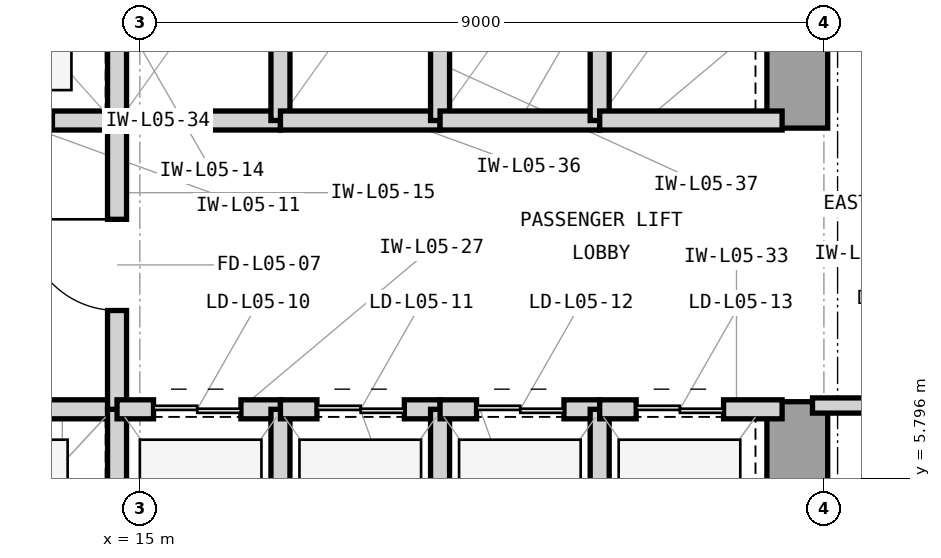
"""IFC4 building model, lengths in metres.
Left out: names, types, materials, properties, quantities, classifications, styles, units other than length and angle.
Written with IfcOpenShell. Run it as: python <this file> out.ifc"""

import sys

from ifc_helpers import new_model, si_unit, direction, frame, frame_2d, origin, place, context, subcontext, project, spatial, rectangle, extrude, element, fill, save


model = new_model("IFC4")
c1 = context("Model", 3, precision=1e-05, world=origin(), true_north=direction((0.0, 1.0)))
c2 = subcontext(c1, "Body", "Model", "MODEL_VIEW")
j1 = project(units=[si_unit("LENGTHUNIT", "METRE"), si_unit("PLANEANGLEUNIT", "RADIAN")], contexts=[c1])
p1 = place(None, origin())
s1 = spatial("IfcSite", under=j1, at=p1, CompositionType="ELEMENT")
p2 = place(p1, origin())
s2 = spatial("IfcBuilding", under=s1, at=p2, CompositionType="ELEMENT")
p3 = place(p2, frame((0.0, 0.0, 25.8)))
s3 = spatial("IfcBuildingStorey", under=s2, at=p3, CompositionType="ELEMENT", Elevation=25.8)
p4 = place(p3, frame((23.65, 3.75, 0.0), z_axis=(0.0, 0.0, 1.0), x_axis=(0.0, 1.0, 0.0)))
e1 = element("IfcWall", 1, at=p4, inside=s3, PredefinedType="SHEAR", context=c2, shape_type="SweptSolid", body=[
    extrude(rectangle(XDim=3.05, YDim=0.8, at=frame_2d((1.525, 0.0))), origin(), (0.0, 0.0, 1.0), 4.2),
])
p5 = place(p3, frame((23.65, 10.4, 0.0), z_axis=(0.0, 0.0, 1.0), x_axis=(0.0, 1.0, 0.0)))
e2 = element("IfcWall", 2, at=p5, inside=s3, PredefinedType="SHEAR", context=c2, shape_type="SweptSolid", body=[
    extrude(rectangle(XDim=3.2, YDim=0.8, at=frame_2d((1.6, 0.0))), origin(), (0.0, 0.0, 1.0), 4.2),
])
p6 = place(p3, frame((11.82, 6.7, 0.0), z_axis=(0.0, 0.0, 1.0), x_axis=(1.0, 0.0, 0.0)))
e3 = element("IfcWall", 3, at=p6, inside=s3, PredefinedType="PARTITIONING", context=c2, shape_type="SweptSolid", body=[
    extrude(rectangle(XDim=2.88, YDim=0.25, at=frame_2d((1.44, 0.0))), origin(), (0.0, 0.0, 1.0), 3.426),
])
p7 = place(p6, frame((0.85, 0.0, 0.0)))
e4 = element("IfcOpeningElement", 4, at=p7, cuts=e3, PredefinedType="OPENING", context=c2, shape_type="SweptSolid", body=[
    extrude(rectangle(XDim=1.1, YDim=2.25, at=frame_2d((0.55, 1.125))), frame((0.0, 0.135, 0.0), z_axis=(0.0, -1.0, 0.0), x_axis=(1.0, 0.0, 0.0)), (0.0, 0.0, 1.0), 0.27),
])
p8 = place(p3, frame((14.7, 3.35, 0.0), z_axis=(0.0, 0.0, 1.0), x_axis=(0.0, 1.0, 0.0)))
e5 = element("IfcWall", 5, at=p8, inside=s3, PredefinedType="PARTITIONING", context=c2, shape_type="SweptSolid", body=[
    extrude(rectangle(XDim=3.35, YDim=0.25, at=frame_2d((1.675, 0.0))), origin(), (0.0, 0.0, 1.0), 3.97),
])
p9 = place(p3, frame((11.95, 10.5, 0.0), z_axis=(0.0, 0.0, 1.0), x_axis=(1.0, 0.0, 0.0)))
e6 = element("IfcWall", 6, at=p9, inside=s3, PredefinedType="PARTITIONING", context=c2, shape_type="SweptSolid", body=[
    extrude(rectangle(XDim=2.75, YDim=0.25, at=frame_2d((1.375, 0.0))), origin(), (0.0, 0.0, 1.0), 3.426),
])
p10 = place(p9, frame((0.8, 0.0, 0.0)))
e7 = element("IfcOpeningElement", 7, at=p10, cuts=e6, PredefinedType="OPENING", context=c2, shape_type="SweptSolid", body=[
    extrude(rectangle(XDim=1.1, YDim=2.25, at=frame_2d((0.55, 1.125))), frame((0.0, 0.135, 0.0), z_axis=(0.0, -1.0, 0.0), x_axis=(1.0, 0.0, 0.0)), (0.0, 0.0, 1.0), 0.27),
])
p11 = place(p3, frame((14.7, 10.5, 0.0), z_axis=(0.0, 0.0, 1.0), x_axis=(0.0, 1.0, 0.0)))
e8 = element("IfcWall", 8, at=p11, inside=s3, PredefinedType="PARTITIONING", context=c2, shape_type="SweptSolid", body=[
    extrude(rectangle(XDim=3.0, YDim=0.25, at=frame_2d((1.5, 0.0))), origin(), (0.0, 0.0, 1.0), 3.97),
])
p12 = place(p3, frame((14.7, 6.7, 0.0), z_axis=(0.0, 0.0, 1.0), x_axis=(0.0, 1.0, 0.0)))
e9 = element("IfcWall", 9, at=p12, inside=s3, PredefinedType="PARTITIONING", context=c2, shape_type="SweptSolid", body=[
    extrude(rectangle(XDim=3.8, YDim=0.25, at=frame_2d((1.9, 0.0))), origin(), (0.0, 0.0, 1.0), 3.97),
])
p13 = place(p12, frame((1.3, 0.0, 0.0)))
e10 = element("IfcOpeningElement", 10, at=p13, cuts=e9, PredefinedType="OPENING", context=c2, shape_type="SweptSolid", body=[
    extrude(rectangle(XDim=1.2, YDim=2.2, at=frame_2d((0.6, 1.1))), frame((0.0, 0.135, 0.0), z_axis=(0.0, -1.0, 0.0), x_axis=(1.0, 0.0, 0.0)), (0.0, 0.0, 1.0), 0.27),
])
p14 = place(p3, frame((14.7, 6.7, 0.0), z_axis=(0.0, 0.0, 1.0), x_axis=(1.0, 0.0, 0.0)))
e11 = element("IfcWall", 11, at=p14, inside=s3, PredefinedType="PARTITIONING", context=c2, shape_type="SweptSolid", body=[
    extrude(rectangle(XDim=2.15, YDim=0.25, at=frame_2d((1.075, 0.0))), origin(), (0.0, 0.0, 1.0), 3.426),
])
p15 = place(p14, frame((0.48, 0.0, 0.0)))
e12 = element("IfcOpeningElement", 12, at=p15, cuts=e11, PredefinedType="OPENING", context=c2, shape_type="SweptSolid", body=[
    extrude(rectangle(XDim=1.15, YDim=2.25, at=frame_2d((0.575, 1.125))), frame((0.0, 0.135, 0.0), z_axis=(0.0, -1.0, 0.0), x_axis=(1.0, 0.0, 0.0)), (0.0, 0.0, 1.0), 0.27),
])
p16 = place(p3, frame((16.85, 3.35, 0.0), z_axis=(0.0, 0.0, 1.0), x_axis=(0.0, 1.0, 0.0)))
e13 = element("IfcWall", 13, at=p16, inside=s3, PredefinedType="PARTITIONING", context=c2, shape_type="SweptSolid", body=[
    extrude(rectangle(XDim=3.35, YDim=0.25, at=frame_2d((1.675, 0.0))), origin(), (0.0, 0.0, 1.0), 3.97),
])
p17 = place(p3, frame((16.85, 6.7, 0.0), z_axis=(0.0, 0.0, 1.0), x_axis=(1.0, 0.0, 0.0)))
e14 = element("IfcWall", 14, at=p17, inside=s3, PredefinedType="PARTITIONING", context=c2, shape_type="SweptSolid", body=[
    extrude(rectangle(XDim=2.1, YDim=0.25, at=frame_2d((1.05, 0.0))), origin(), (0.0, 0.0, 1.0), 3.426),
])
p18 = place(p17, frame((0.48, 0.0, 0.0)))
e15 = element("IfcOpeningElement", 15, at=p18, cuts=e14, PredefinedType="OPENING", context=c2, shape_type="SweptSolid", body=[
    extrude(rectangle(XDim=1.15, YDim=2.25, at=frame_2d((0.575, 1.125))), frame((0.0, 0.135, 0.0), z_axis=(0.0, -1.0, 0.0), x_axis=(1.0, 0.0, 0.0)), (0.0, 0.0, 1.0), 0.27),
])
p19 = place(p3, frame((18.95, 3.35, 0.0), z_axis=(0.0, 0.0, 1.0), x_axis=(0.0, 1.0, 0.0)))
e16 = element("IfcWall", 16, at=p19, inside=s3, PredefinedType="PARTITIONING", context=c2, shape_type="SweptSolid", body=[
    extrude(rectangle(XDim=3.35, YDim=0.25, at=frame_2d((1.675, 0.0))), origin(), (0.0, 0.0, 1.0), 3.97),
])
p20 = place(p3, frame((18.95, 6.7, 0.0), z_axis=(0.0, 0.0, 1.0), x_axis=(1.0, 0.0, 0.0)))
e17 = element("IfcWall", 17, at=p20, inside=s3, PredefinedType="PARTITIONING", context=c2, shape_type="SweptSolid", body=[
    extrude(rectangle(XDim=2.1, YDim=0.25, at=frame_2d((1.05, 0.0))), origin(), (0.0, 0.0, 1.0), 3.426),
])
p21 = place(p20, frame((0.48, 0.0, 0.0)))
e18 = element("IfcOpeningElement", 18, at=p21, cuts=e17, PredefinedType="OPENING", context=c2, shape_type="SweptSolid", body=[
    extrude(rectangle(XDim=1.15, YDim=2.25, at=frame_2d((0.575, 1.125))), frame((0.0, 0.135, 0.0), z_axis=(0.0, -1.0, 0.0), x_axis=(1.0, 0.0, 0.0)), (0.0, 0.0, 1.0), 0.27),
])
p22 = place(p3, frame((21.05, 3.35, 0.0), z_axis=(0.0, 0.0, 1.0), x_axis=(0.0, 1.0, 0.0)))
e19 = element("IfcWall", 19, at=p22, inside=s3, PredefinedType="PARTITIONING", context=c2, shape_type="SweptSolid", body=[
    extrude(rectangle(XDim=3.35, YDim=0.25, at=frame_2d((1.675, 0.0))), origin(), (0.0, 0.0, 1.0), 3.97),
])
p23 = place(p3, frame((21.05, 6.7, 0.0), z_axis=(0.0, 0.0, 1.0), x_axis=(1.0, 0.0, 0.0)))
e20 = element("IfcWall", 20, at=p23, inside=s3, PredefinedType="PARTITIONING", context=c2, shape_type="SweptSolid", body=[
    extrude(rectangle(XDim=2.4, YDim=0.25, at=frame_2d((1.2, 0.0))), origin(), (0.0, 0.0, 1.0), 3.426),
])
p24 = place(p23, frame((0.48, 0.0, 0.0)))
e21 = element("IfcOpeningElement", 21, at=p24, cuts=e20, PredefinedType="OPENING", context=c2, shape_type="SweptSolid", body=[
    extrude(rectangle(XDim=1.15, YDim=2.25, at=frame_2d((0.575, 1.125))), frame((0.0, 0.135, 0.0), z_axis=(0.0, -1.0, 0.0), x_axis=(1.0, 0.0, 0.0)), (0.0, 0.0, 1.0), 0.27),
])
p25 = place(p3, frame((14.7, 10.5, 0.0), z_axis=(0.0, 0.0, 1.0), x_axis=(1.0, 0.0, 0.0)))
e22 = element("IfcWall", 22, at=p25, inside=s3, PredefinedType="PARTITIONING", context=c2, shape_type="SweptSolid", body=[
    extrude(rectangle(XDim=2.15, YDim=0.25, at=frame_2d((1.075, 0.0))), origin(), (0.0, 0.0, 1.0), 3.426),
])
p26 = place(p3, frame((16.85, 10.5, 0.0), z_axis=(0.0, 0.0, 1.0), x_axis=(0.0, 1.0, 0.0)))
e23 = element("IfcWall", 23, at=p26, inside=s3, PredefinedType="PARTITIONING", context=c2, shape_type="SweptSolid", body=[
    extrude(rectangle(XDim=3.0, YDim=0.25, at=frame_2d((1.5, 0.0))), origin(), (0.0, 0.0, 1.0), 3.97),
])
p27 = place(p3, frame((16.85, 10.5, 0.0), z_axis=(0.0, 0.0, 1.0), x_axis=(1.0, 0.0, 0.0)))
e24 = element("IfcWall", 24, at=p27, inside=s3, PredefinedType="PARTITIONING", context=c2, shape_type="SweptSolid", body=[
    extrude(rectangle(XDim=2.1, YDim=0.25, at=frame_2d((1.05, 0.0))), origin(), (0.0, 0.0, 1.0), 3.426),
])
p28 = place(p3, frame((18.95, 10.5, 0.0), z_axis=(0.0, 0.0, 1.0), x_axis=(0.0, 1.0, 0.0)))
e25 = element("IfcWall", 25, at=p28, inside=s3, PredefinedType="PARTITIONING", context=c2, shape_type="SweptSolid", body=[
    extrude(rectangle(XDim=3.0, YDim=0.25, at=frame_2d((1.5, 0.0))), origin(), (0.0, 0.0, 1.0), 3.97),
])
p29 = place(p3, frame((18.95, 10.5, 0.0), z_axis=(0.0, 0.0, 1.0), x_axis=(1.0, 0.0, 0.0)))
e26 = element("IfcWall", 26, at=p29, inside=s3, PredefinedType="PARTITIONING", context=c2, shape_type="SweptSolid", body=[
    extrude(rectangle(XDim=2.1, YDim=0.25, at=frame_2d((1.05, 0.0))), origin(), (0.0, 0.0, 1.0), 3.426),
])
p30 = place(p3, frame((21.05, 10.5, 0.0), z_axis=(0.0, 0.0, 1.0), x_axis=(0.0, 1.0, 0.0)))
e27 = element("IfcWall", 27, at=p30, inside=s3, PredefinedType="PARTITIONING", context=c2, shape_type="SweptSolid", body=[
    extrude(rectangle(XDim=3.0, YDim=0.25, at=frame_2d((1.5, 0.0))), origin(), (0.0, 0.0, 1.0), 3.97),
])
p31 = place(p3, frame((21.05, 10.5, 0.0), z_axis=(0.0, 0.0, 1.0), x_axis=(1.0, 0.0, 0.0)))
e28 = element("IfcWall", 28, at=p31, inside=s3, PredefinedType="PARTITIONING", context=c2, shape_type="SweptSolid", body=[
    extrude(rectangle(XDim=2.4, YDim=0.25, at=frame_2d((1.2, 0.0))), origin(), (0.0, 0.0, 1.0), 3.426),
])
p32 = place(p3, frame((23.85, 6.75, 0.0), z_axis=(0.0, 0.0, 1.0), x_axis=(1.0, 0.0, 0.0)))
e29 = element("IfcWall", 29, at=p32, inside=s3, PredefinedType="PARTITIONING", context=c2, shape_type="SweptSolid", body=[
    extrude(rectangle(XDim=2.85, YDim=0.2, at=frame_2d((1.425, 0.0))), origin(), (0.0, 0.0, 1.0), 3.97),
])
p33 = place(p32, frame((0.7, 0.0, 0.0)))
e30 = element("IfcOpeningElement", 30, at=p33, cuts=e29, PredefinedType="OPENING", context=c2, shape_type="SweptSolid", body=[
    extrude(rectangle(XDim=1.0, YDim=2.15, at=frame_2d((0.5, 1.075))), frame((0.0, 0.11, 0.0), z_axis=(0.0, -1.0, 0.0), x_axis=(1.0, 0.0, 0.0)), (0.0, 0.0, 1.0), 0.22),
])
p34 = place(p13, origin())
e31 = element("IfcDoor", 31, at=p34, inside=s3, OperationType="SINGLE_SWING_RIGHT", PredefinedType="DOOR", context=c2, shape_type="SweptSolid", body=[
    extrude(rectangle(XDim=1.2, YDim=2.2, at=frame_2d((0.6, 1.1))), frame((0.0, 0.025, 0.0), z_axis=(0.0, -1.0, 0.0), x_axis=(1.0, 0.0, 0.0)), (0.0, 0.0, 1.0), 0.05),
])
fill(e10, e31)
p35 = place(p15, origin())
e32 = element("IfcDoor", 32, at=p35, inside=s3, OperationType="DOUBLE_DOOR_SLIDING", PredefinedType="DOOR", context=c2, shape_type="SweptSolid", body=[
    extrude(rectangle(XDim=1.15, YDim=2.25, at=frame_2d((0.575, 1.125))), frame((0.0, 0.025, 0.0), z_axis=(0.0, -1.0, 0.0), x_axis=(1.0, 0.0, 0.0)), (0.0, 0.0, 1.0), 0.05),
])
fill(e12, e32)
p36 = place(p18, origin())
e33 = element("IfcDoor", 33, at=p36, inside=s3, OperationType="DOUBLE_DOOR_SLIDING", PredefinedType="DOOR", context=c2, shape_type="SweptSolid", body=[
    extrude(rectangle(XDim=1.15, YDim=2.25, at=frame_2d((0.575, 1.125))), frame((0.0, 0.025, 0.0), z_axis=(0.0, -1.0, 0.0), x_axis=(1.0, 0.0, 0.0)), (0.0, 0.0, 1.0), 0.05),
])
fill(e15, e33)
p37 = place(p21, origin())
e34 = element("IfcDoor", 34, at=p37, inside=s3, OperationType="DOUBLE_DOOR_SLIDING", PredefinedType="DOOR", context=c2, shape_type="SweptSolid", body=[
    extrude(rectangle(XDim=1.15, YDim=2.25, at=frame_2d((0.575, 1.125))), frame((0.0, 0.025, 0.0), z_axis=(0.0, -1.0, 0.0), x_axis=(1.0, 0.0, 0.0)), (0.0, 0.0, 1.0), 0.05),
])
fill(e18, e34)
p38 = place(p24, origin())
e35 = element("IfcDoor", 35, at=p38, inside=s3, OperationType="DOUBLE_DOOR_SLIDING", PredefinedType="DOOR", context=c2, shape_type="SweptSolid", body=[
    extrude(rectangle(XDim=1.15, YDim=2.25, at=frame_2d((0.575, 1.125))), frame((0.0, 0.025, 0.0), z_axis=(0.0, -1.0, 0.0), x_axis=(1.0, 0.0, 0.0)), (0.0, 0.0, 1.0), 0.05),
])
fill(e21, e35)
save(model, sys.argv[1])
